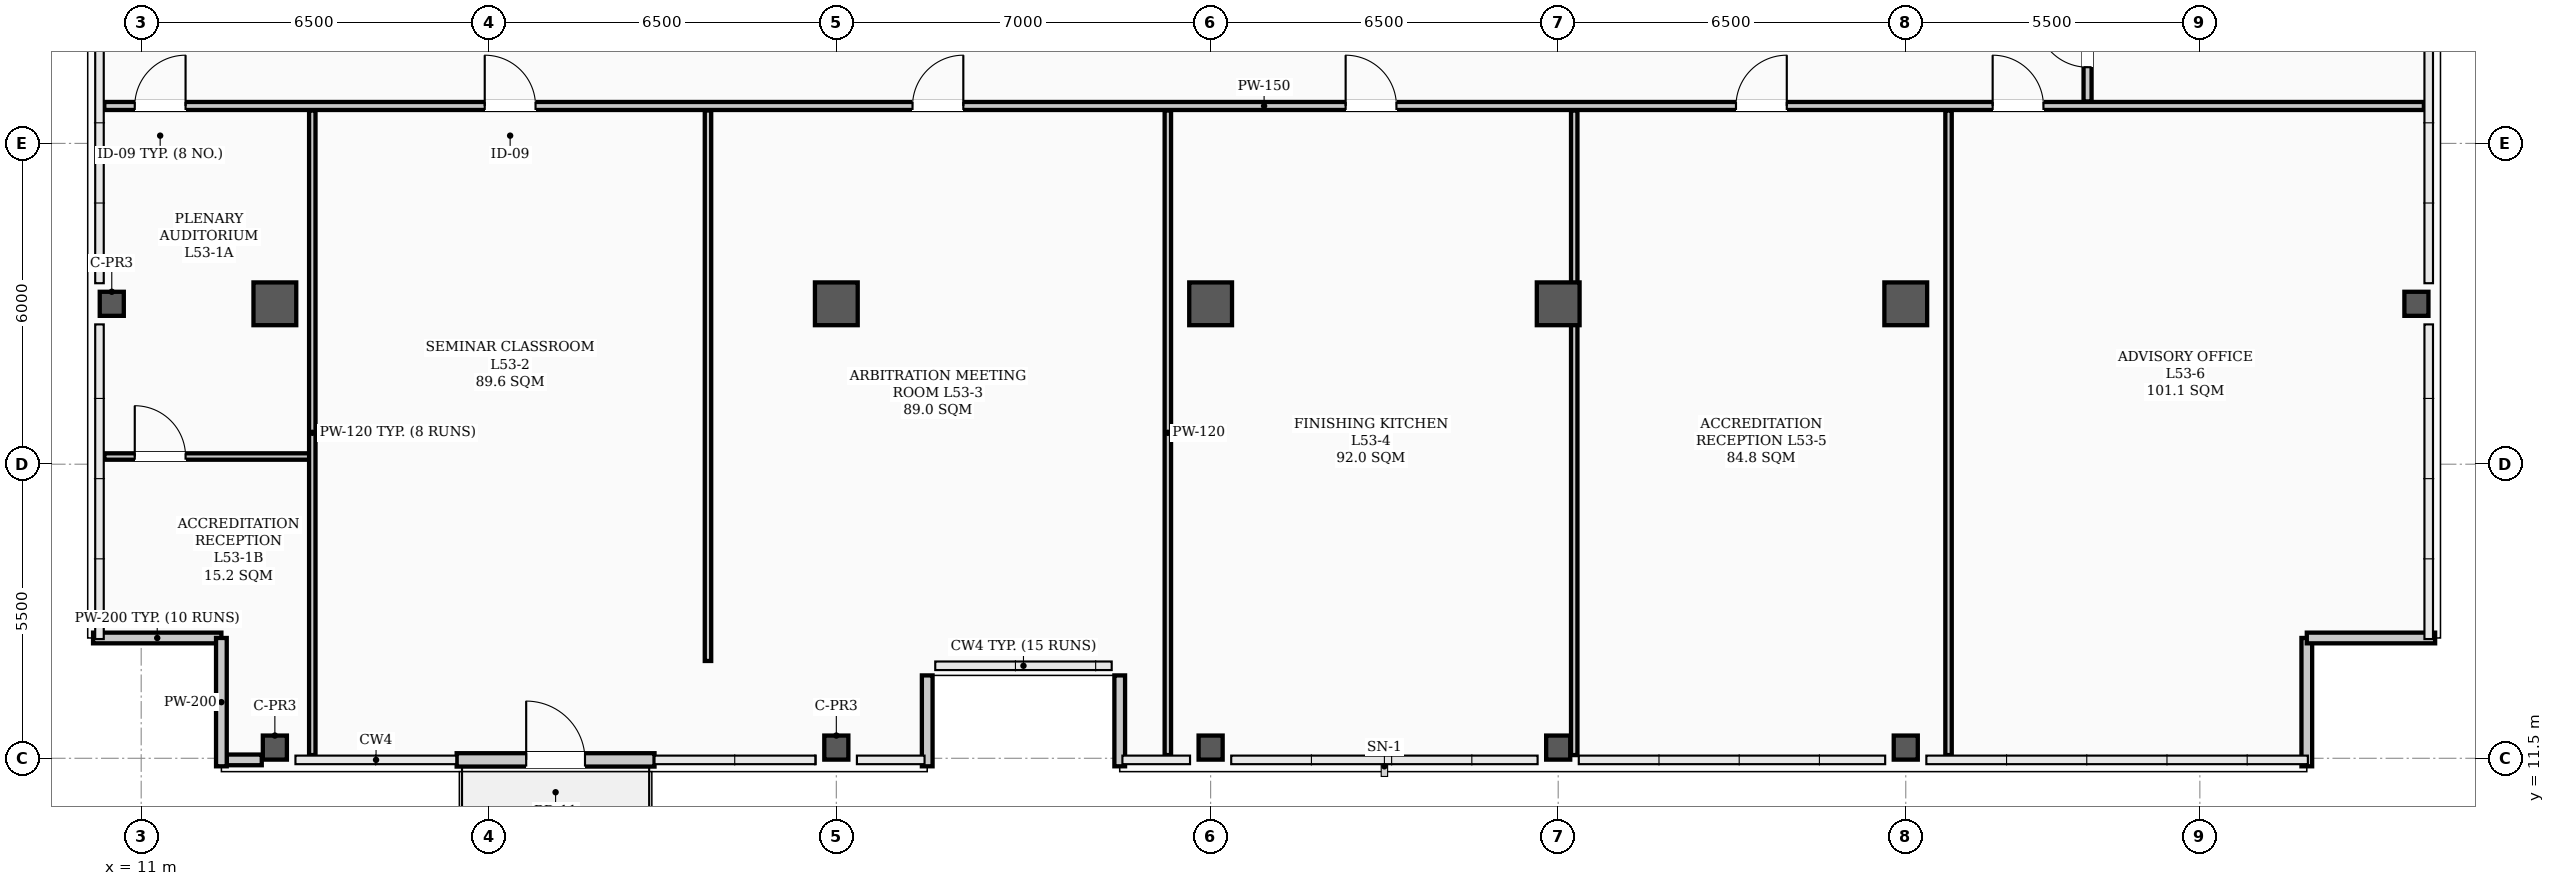
"""IFC4 building model, lengths in metres.
Left out: names, types, materials, properties, quantities, classifications, styles, units other than length and angle.
Written with IfcOpenShell. Run it as: python <this file> out.ifc"""

import sys

from ifc_helpers import new_model, si_unit, direction, frame, frame_2d, origin, origin_2d, place, context, subcontext, project, spatial, rectangle, hollow_rectangle, extrude, element, fill, save


model = new_model("IFC4")
c1 = context("Model", 3, precision=1e-05, world=origin(), true_north=direction((0.0, 1.0)))
c2 = subcontext(c1, "Body", "Model", "MODEL_VIEW")
j1 = project(units=[si_unit("LENGTHUNIT", "METRE"), si_unit("PLANEANGLEUNIT", "RADIAN")], contexts=[c1])
p1 = place(None, origin())
s1 = spatial("IfcSite", under=j1, at=p1, CompositionType="ELEMENT")
p2 = place(p1, origin())
s2 = spatial("IfcBuilding", under=s1, at=p2, CompositionType="ELEMENT")
p3 = place(p2, frame((0.0, 0.0, 215.0)))
s3 = spatial("IfcBuildingStorey", under=s2, at=p3, CompositionType="ELEMENT", Elevation=215.0)
for number, where, z_axis, x_axis in (
    (1, (13.5, 20.0, 0.0), (0.0, 0.0, 1.0), (1.0, 0.0, 0.0)),
    (2, (24.0, 20.0, 0.0), (0.0, 0.0, 1.0), (1.0, 0.0, 0.0)),
    (3, (31.0, 20.0, 0.0), (0.0, 0.0, 1.0), (1.0, 0.0, 0.0)),
    (4, (37.5, 20.0, 0.0), (0.0, 0.0, 1.0), (1.0, 0.0, 0.0)),
    (5, (44.0, 20.0, 0.0), (0.0, 0.0, 1.0), (1.0, 0.0, 0.0)),
):
    element("IfcColumn", number, at=place(p3, frame(where, z_axis=z_axis, x_axis=x_axis)), inside=s3, PredefinedType="COLUMN", context=c2, shape_type="SweptSolid", body=[
        extrude(hollow_rectangle(XDim=0.8, YDim=0.8, WallThickness=0.032, InnerFilletRadius=0.016, OuterFilletRadius=0.048, at=origin_2d()), origin(), (0.0, 0.0, 1.0), 3.9),
    ])
for number, where, z_axis, x_axis in (
    (6, (10.45, 20.0, 0.0), (0.0, 0.0, 1.0), (1.0, 0.0, 0.0)),
    (7, (13.5, 11.7, 0.0), (0.0, 0.0, 1.0), (1.0, 0.0, 0.0)),
    (8, (24.0, 11.7, 0.0), (0.0, 0.0, 1.0), (1.0, 0.0, 0.0)),
    (9, (31.0, 11.7, 0.0), (0.0, 0.0, 1.0), (1.0, 0.0, 0.0)),
    (10, (37.5, 11.7, 0.0), (0.0, 0.0, 1.0), (1.0, 0.0, 0.0)),
    (11, (44.0, 11.7, 0.0), (0.0, 0.0, 1.0), (1.0, 0.0, 0.0)),
    (12, (53.55, 20.0, 0.0), (0.0, 0.0, 1.0), (1.0, 0.0, 0.0)),
):
    element("IfcColumn", number, at=place(p3, frame(where, z_axis=z_axis, x_axis=x_axis)), inside=s3, PredefinedType="COLUMN", context=c2, shape_type="SweptSolid", body=[
        extrude(hollow_rectangle(XDim=0.45, YDim=0.45, WallThickness=0.022, InnerFilletRadius=0.022, OuterFilletRadius=0.044, at=origin_2d()), origin(), (0.0, 0.0, 1.0), 3.9),
    ])
p4 = place(p3, frame((12.6, 11.47, 0.0), z_axis=(0.0, 0.0, 1.0), x_axis=(1.0, 0.0, 0.0)))
e13 = element("IfcWall", 13, at=p4, inside=s3, PredefinedType="PARAPET", context=c2, shape_type="SweptSolid", body=[
    extrude(rectangle(XDim=0.655, YDim=0.2, at=frame_2d((0.327, 0.0))), origin(), (0.0, 0.0, 1.0), 1.2),
])
for number, where, z_axis, x_axis in (
    (14, (10.1, 13.75, 0.0), (0.0, 0.0, 1.0), (1.0, 0.0, 0.0)),
    (15, (12.5, 13.75, 0.0), (0.0, 0.0, 1.0), (0.0, -1.0, 0.0)),
    (16, (51.5, 11.35, 0.0), (0.0, 0.0, 1.0), (0.0, 1.0, 0.0)),
    (17, (51.5, 13.75, 0.0), (0.0, 0.0, 1.0), (1.0, 0.0, 0.0)),
):
    element("IfcWall", number, at=place(p3, frame(where, z_axis=z_axis, x_axis=x_axis)), inside=s3, PredefinedType="PARAPET", context=c2, shape_type="SweptSolid", body=[
        extrude(rectangle(XDim=2.4, YDim=0.2, at=frame_2d((1.2, 0.0))), origin(), (0.0, 0.0, 1.0), 1.2),
    ])
for number, where, z_axis, x_axis in (
    (18, (25.7, 11.35, 0.0), (0.0, 0.0, 1.0), (0.0, 1.0, 0.0)),
    (19, (29.3, 13.05, 0.0), (0.0, 0.0, 1.0), (0.0, -1.0, 0.0)),
):
    element("IfcWall", number, at=place(p3, frame(where, z_axis=z_axis, x_axis=x_axis)), inside=s3, PredefinedType="PARAPET", context=c2, shape_type="SweptSolid", body=[
        extrude(rectangle(XDim=1.7, YDim=0.2, at=frame_2d((0.85, 0.0))), origin(), (0.0, 0.0, 1.0), 1.2),
    ])
p5 = place(p3, frame((16.9, 11.47, 0.0), z_axis=(0.0, 0.0, 1.0), x_axis=(1.0, 0.0, 0.0)))
e20 = element("IfcWall", 20, at=p5, inside=s3, PredefinedType="STANDARD", context=c2, shape_type="SweptSolid", body=[
    extrude(rectangle(XDim=3.7, YDim=0.25, at=frame_2d((1.85, 0.0))), origin(), (0.0, 0.0, 1.0), 3.18),
])
p6 = place(p5, frame((1.3, 0.0, 0.0)))
e21 = element("IfcOpeningElement", 21, at=p6, cuts=e20, PredefinedType="OPENING", context=c2, shape_type="SweptSolid", body=[
    extrude(rectangle(XDim=1.1, YDim=2.2, at=frame_2d((0.55, 1.1))), frame((0.0, 0.135, 0.0), z_axis=(0.0, -1.0, 0.0), x_axis=(1.0, 0.0, 0.0)), (0.0, 0.0, 1.0), 0.27),
])
p7 = place(p3, frame((10.31, 23.7, 0.0), z_axis=(0.0, 0.0, 1.0), x_axis=(1.0, 0.0, 0.0)))
e22 = element("IfcWall", 22, at=p7, inside=s3, PredefinedType="PARTITIONING", context=c2, shape_type="SweptSolid", body=[
    extrude(rectangle(XDim=43.38, YDim=0.15, at=frame_2d((21.69, 0.0))), origin(), (0.0, 0.0, 1.0), 3.2),
])
p8 = place(p7, frame((0.57, 0.0, 0.0)))
e23 = element("IfcOpeningElement", 23, at=p8, cuts=e22, PredefinedType="OPENING", context=c2, shape_type="SweptSolid", body=[
    extrude(rectangle(XDim=0.95, YDim=2.08, at=frame_2d((0.475, 1.04))), frame((0.0, 0.085, 0.0), z_axis=(0.0, -1.0, 0.0), x_axis=(1.0, 0.0, 0.0)), (0.0, 0.0, 1.0), 0.17),
])
p9 = place(p7, frame((7.115, 0.0, 0.0)))
e24 = element("IfcOpeningElement", 24, at=p9, cuts=e22, PredefinedType="OPENING", context=c2, shape_type="SweptSolid", body=[
    extrude(rectangle(XDim=0.95, YDim=2.08, at=frame_2d((0.475, 1.04))), frame((0.0, 0.085, 0.0), z_axis=(0.0, -1.0, 0.0), x_axis=(1.0, 0.0, 0.0)), (0.0, 0.0, 1.0), 0.17),
])
p10 = place(p7, frame((15.115, 0.0, 0.0)))
e25 = element("IfcOpeningElement", 25, at=p10, cuts=e22, PredefinedType="OPENING", context=c2, shape_type="SweptSolid", body=[
    extrude(rectangle(XDim=0.95, YDim=2.08, at=frame_2d((0.475, 1.04))), frame((0.0, 0.085, 0.0), z_axis=(0.0, -1.0, 0.0), x_axis=(1.0, 0.0, 0.0)), (0.0, 0.0, 1.0), 0.17),
])
p11 = place(p7, frame((23.215, 0.0, 0.0)))
e26 = element("IfcOpeningElement", 26, at=p11, cuts=e22, PredefinedType="OPENING", context=c2, shape_type="SweptSolid", body=[
    extrude(rectangle(XDim=0.95, YDim=2.08, at=frame_2d((0.475, 1.04))), frame((0.0, 0.085, 0.0), z_axis=(0.0, -1.0, 0.0), x_axis=(1.0, 0.0, 0.0)), (0.0, 0.0, 1.0), 0.17),
])
p12 = place(p7, frame((30.515, 0.0, 0.0)))
e27 = element("IfcOpeningElement", 27, at=p12, cuts=e22, PredefinedType="OPENING", context=c2, shape_type="SweptSolid", body=[
    extrude(rectangle(XDim=0.95, YDim=2.08, at=frame_2d((0.475, 1.04))), frame((0.0, 0.085, 0.0), z_axis=(0.0, -1.0, 0.0), x_axis=(1.0, 0.0, 0.0)), (0.0, 0.0, 1.0), 0.17),
])
p13 = place(p7, frame((35.315, 0.0, 0.0)))
e28 = element("IfcOpeningElement", 28, at=p13, cuts=e22, PredefinedType="OPENING", context=c2, shape_type="SweptSolid", body=[
    extrude(rectangle(XDim=0.95, YDim=2.08, at=frame_2d((0.475, 1.04))), frame((0.0, 0.085, 0.0), z_axis=(0.0, -1.0, 0.0), x_axis=(1.0, 0.0, 0.0)), (0.0, 0.0, 1.0), 0.17),
])
p14 = place(p3, frame((10.31, 17.144, 0.0), z_axis=(0.0, 0.0, 1.0), x_axis=(1.0, 0.0, 0.0)))
e29 = element("IfcWall", 29, at=p14, inside=s3, PredefinedType="PARTITIONING", context=c2, shape_type="SweptSolid", body=[
    extrude(rectangle(XDim=3.89, YDim=0.12, at=frame_2d((1.945, 0.0))), origin(), (0.0, 0.0, 1.0), 3.2),
])
p15 = place(p14, frame((0.57, 0.0, 0.0)))
e30 = element("IfcOpeningElement", 30, at=p15, cuts=e29, PredefinedType="OPENING", context=c2, shape_type="SweptSolid", body=[
    extrude(rectangle(XDim=0.95, YDim=2.08, at=frame_2d((0.475, 1.04))), frame((0.0, 0.07, 0.0), z_axis=(0.0, -1.0, 0.0), x_axis=(1.0, 0.0, 0.0)), (0.0, 0.0, 1.0), 0.14),
])
p16 = place(p3, frame((47.4, 23.785, 0.0), z_axis=(0.0, 0.0, 1.0), x_axis=(0.0, 1.0, 0.0)))
e31 = element("IfcWall", 31, at=p16, inside=s3, PredefinedType="PARTITIONING", context=c2, shape_type="SweptSolid", body=[
    extrude(rectangle(XDim=13.13, YDim=0.15, at=frame_2d((6.565, 0.0))), origin(), (0.0, 0.0, 1.0), 3.1),
])
p17 = place(p16, frame((0.64, 0.0, 0.0)))
e32 = element("IfcOpeningElement", 32, at=p17, cuts=e31, PredefinedType="OPENING", context=c2, shape_type="SweptSolid", body=[
    extrude(rectangle(XDim=0.95, YDim=2.08, at=frame_2d((0.475, 1.04))), frame((0.0, 0.085, 0.0), z_axis=(0.0, -1.0, 0.0), x_axis=(1.0, 0.0, 0.0)), (0.0, 0.0, 1.0), 0.17),
])
p18 = place(p3, frame((14.2, 11.56, 0.0), z_axis=(0.0, 0.0, 1.0), x_axis=(0.0, 1.0, 0.0)))
e33 = element("IfcWall", 33, at=p18, inside=s3, PredefinedType="PARTITIONING", context=c2, shape_type="SweptSolid", body=[
    extrude(rectangle(XDim=12.055, YDim=0.12, at=frame_2d((6.027, 0.0))), origin(), (0.0, 0.0, 1.0), 3.1),
])
p19 = place(p3, frame((21.6, 13.32, 0.0), z_axis=(0.0, 0.0, 1.0), x_axis=(0.0, 1.0, 0.0)))
e34 = element("IfcWall", 34, at=p19, inside=s3, PredefinedType="PARTITIONING", context=c2, shape_type="SweptSolid", body=[
    extrude(rectangle(XDim=10.295, YDim=0.12, at=frame_2d((5.147, 0.0))), origin(), (0.0, 0.0, 1.0), 3.1),
])
for number, where, z_axis, x_axis in (
    (35, (30.2, 11.56, 0.0), (0.0, 0.0, 1.0), (0.0, 1.0, 0.0)),
    (36, (37.8, 11.56, 0.0), (0.0, 0.0, 1.0), (0.0, 1.0, 0.0)),
    (37, (44.8, 11.56, 0.0), (0.0, 0.0, 1.0), (0.0, 1.0, 0.0)),
):
    element("IfcWall", number, at=place(p3, frame(where, z_axis=z_axis, x_axis=x_axis)), inside=s3, PredefinedType="PARTITIONING", context=c2, shape_type="SweptSolid", body=[
        extrude(rectangle(XDim=12.055, YDim=0.12, at=frame_2d((6.027, 0.0))), origin(), (0.0, 0.0, 1.0), 3.1),
    ])
p20 = place(p6, origin())
e38 = element("IfcDoor", 38, at=p20, inside=s3, OperationType="SINGLE_SWING_LEFT", PredefinedType="DOOR", context=c2, shape_type="SweptSolid", body=[
    extrude(rectangle(XDim=1.1, YDim=2.2, at=frame_2d((0.55, 1.1))), frame((0.0, 0.025, 0.0), z_axis=(0.0, -1.0, 0.0), x_axis=(1.0, 0.0, 0.0)), (0.0, 0.0, 1.0), 0.05),
])
fill(e21, e38)
p21 = place(p15, origin())
e39 = element("IfcDoor", 39, at=p21, inside=s3, OperationType="SINGLE_SWING_LEFT", PredefinedType="DOOR", context=c2, shape_type="SweptSolid", body=[
    extrude(rectangle(XDim=0.95, YDim=2.08, at=frame_2d((0.475, 1.04))), frame((0.0, 0.025, 0.0), z_axis=(0.0, -1.0, 0.0), x_axis=(1.0, 0.0, 0.0)), (0.0, 0.0, 1.0), 0.05),
])
fill(e30, e39)
p22 = place(p8, origin())
e40 = element("IfcDoor", 40, at=p22, inside=s3, OperationType="SINGLE_SWING_RIGHT", PredefinedType="DOOR", context=c2, shape_type="SweptSolid", body=[
    extrude(rectangle(XDim=0.95, YDim=2.08, at=frame_2d((0.475, 1.04))), frame((0.0, 0.025, 0.0), z_axis=(0.0, -1.0, 0.0), x_axis=(1.0, 0.0, 0.0)), (0.0, 0.0, 1.0), 0.05),
])
fill(e23, e40)
p23 = place(p9, origin())
e41 = element("IfcDoor", 41, at=p23, inside=s3, OperationType="SINGLE_SWING_LEFT", PredefinedType="DOOR", context=c2, shape_type="SweptSolid", body=[
    extrude(rectangle(XDim=0.95, YDim=2.08, at=frame_2d((0.475, 1.04))), frame((0.0, 0.025, 0.0), z_axis=(0.0, -1.0, 0.0), x_axis=(1.0, 0.0, 0.0)), (0.0, 0.0, 1.0), 0.05),
])
fill(e24, e41)
p24 = place(p10, origin())
e42 = element("IfcDoor", 42, at=p24, inside=s3, OperationType="SINGLE_SWING_RIGHT", PredefinedType="DOOR", context=c2, shape_type="SweptSolid", body=[
    extrude(rectangle(XDim=0.95, YDim=2.08, at=frame_2d((0.475, 1.04))), frame((0.0, 0.025, 0.0), z_axis=(0.0, -1.0, 0.0), x_axis=(1.0, 0.0, 0.0)), (0.0, 0.0, 1.0), 0.05),
])
fill(e25, e42)
p25 = place(p11, origin())
e43 = element("IfcDoor", 43, at=p25, inside=s3, OperationType="SINGLE_SWING_LEFT", PredefinedType="DOOR", context=c2, shape_type="SweptSolid", body=[
    extrude(rectangle(XDim=0.95, YDim=2.08, at=frame_2d((0.475, 1.04))), frame((0.0, 0.025, 0.0), z_axis=(0.0, -1.0, 0.0), x_axis=(1.0, 0.0, 0.0)), (0.0, 0.0, 1.0), 0.05),
])
fill(e26, e43)
p26 = place(p12, origin())
e44 = element("IfcDoor", 44, at=p26, inside=s3, OperationType="SINGLE_SWING_RIGHT", PredefinedType="DOOR", context=c2, shape_type="SweptSolid", body=[
    extrude(rectangle(XDim=0.95, YDim=2.08, at=frame_2d((0.475, 1.04))), frame((0.0, 0.025, 0.0), z_axis=(0.0, -1.0, 0.0), x_axis=(1.0, 0.0, 0.0)), (0.0, 0.0, 1.0), 0.05),
])
fill(e27, e44)
p27 = place(p13, origin())
e45 = element("IfcDoor", 45, at=p27, inside=s3, OperationType="SINGLE_SWING_LEFT", PredefinedType="DOOR", context=c2, shape_type="SweptSolid", body=[
    extrude(rectangle(XDim=0.95, YDim=2.08, at=frame_2d((0.475, 1.04))), frame((0.0, 0.025, 0.0), z_axis=(0.0, -1.0, 0.0), x_axis=(1.0, 0.0, 0.0)), (0.0, 0.0, 1.0), 0.05),
])
fill(e28, e45)
p28 = place(p17, origin())
e46 = element("IfcDoor", 46, at=p28, inside=s3, OperationType="SINGLE_SWING_RIGHT", PredefinedType="DOOR", context=c2, shape_type="SweptSolid", body=[
    extrude(rectangle(XDim=0.95, YDim=2.08, at=frame_2d((0.475, 1.04))), frame((0.0, 0.025, 0.0), z_axis=(0.0, -1.0, 0.0), x_axis=(1.0, 0.0, 0.0)), (0.0, 0.0, 1.0), 0.05),
])
fill(e32, e46)
save(model, sys.argv[1])
